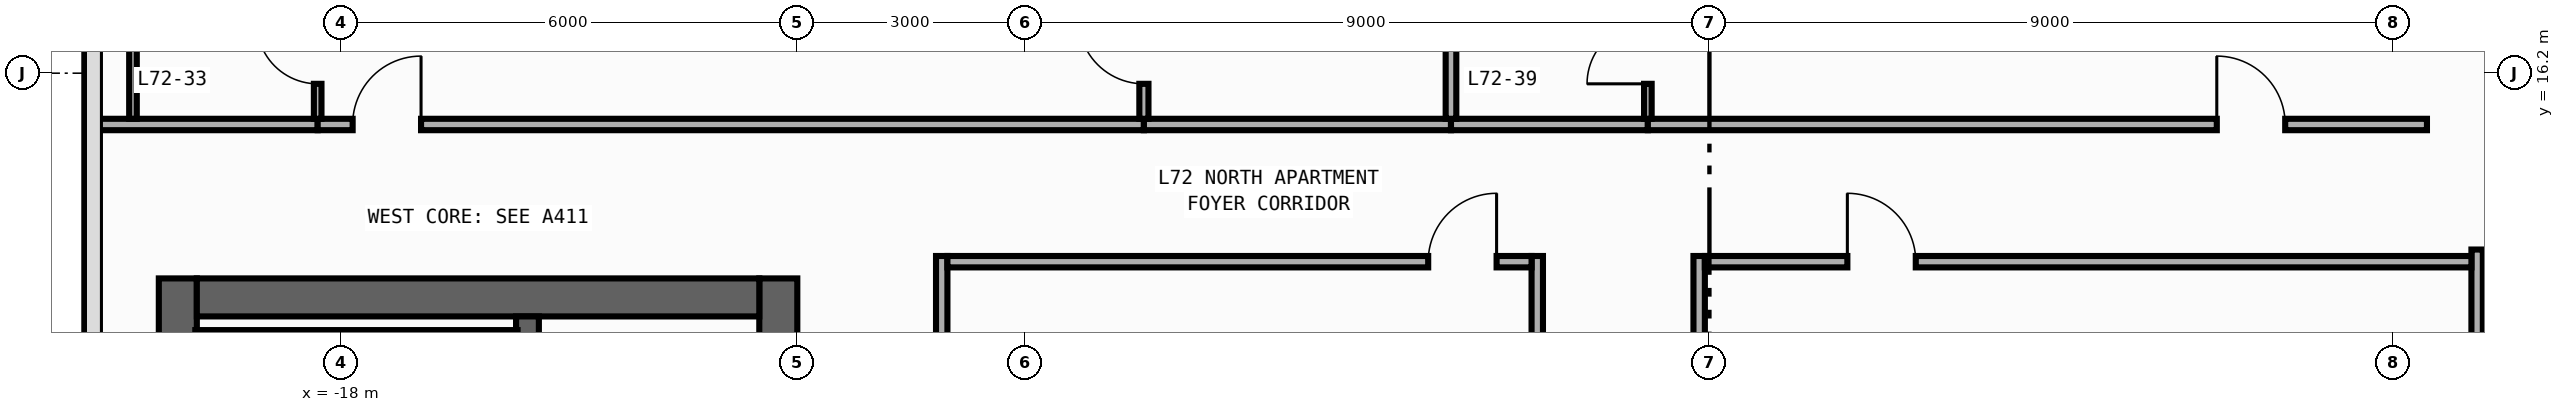
"""IFC4 building model, lengths in metres.
Left out: names, types, materials, properties, quantities, classifications, styles, units other than length and angle.
Written with IfcOpenShell. Run it as: python <this file> out.ifc"""

import sys

from ifc_helpers import new_model, si_unit, direction, frame, frame_2d, origin, place, context, subcontext, project, spatial, rectangle, extrude, element, fill, save


model = new_model("IFC4")
c1 = context("Model", 3, precision=1e-05, world=origin(), true_north=direction((0.0, 1.0)))
c2 = subcontext(c1, "Body", "Model", "MODEL_VIEW")
j1 = project(units=[si_unit("LENGTHUNIT", "METRE"), si_unit("PLANEANGLEUNIT", "RADIAN")], contexts=[c1])
p1 = place(None, origin())
s1 = spatial("IfcSite", under=j1, at=p1, CompositionType="ELEMENT")
p2 = place(p1, origin())
s2 = spatial("IfcBuilding", under=s1, at=p2, CompositionType="ELEMENT")
p3 = place(p2, frame((0.0, 0.0, 300.4)))
s3 = spatial("IfcBuildingStorey", under=s2, at=p3, CompositionType="ELEMENT", Elevation=300.4)
p4 = place(p3, frame((-20.15, -13.5, 0.0), z_axis=(0.0, 0.0, 1.0), x_axis=(0.0, 1.0, 0.0)))
e1 = element("IfcWall", 1, at=p4, inside=s3, PredefinedType="SHEAR", context=c2, shape_type="SweptSolid", body=[
    extrude(rectangle(XDim=27.0, YDim=0.5, at=frame_2d((13.5, 0.0))), origin(), (0.0, 0.0, 1.0), 3.54),
])
p5 = place(p3, frame((-12.25, -13.5, 0.0), z_axis=(0.0, 0.0, 1.0), x_axis=(0.0, 1.0, 0.0)))
e2 = element("IfcWall", 2, at=p5, inside=s3, PredefinedType="SHEAR", context=c2, shape_type="SweptSolid", body=[
    extrude(rectangle(XDim=27.0, YDim=0.5, at=frame_2d((13.5, 0.0))), origin(), (0.0, 0.0, 1.0), 3.54),
])
p6 = place(p5, frame((15.175, 0.0, 0.0)))
e3 = element("IfcOpeningElement", 3, at=p6, cuts=e2, PredefinedType="OPENING", context=c2, shape_type="SweptSolid", body=[
    extrude(rectangle(XDim=0.85, YDim=2.1, at=frame_2d((0.425, 1.05))), frame((0.0, 0.26, 0.0), z_axis=(0.0, -1.0, 0.0), x_axis=(1.0, 0.0, 0.0)), (0.0, 0.0, 1.0), 0.52),
])
p7 = place(p5, frame((21.275, 0.0, 0.0)))
e4 = element("IfcOpeningElement", 4, at=p7, cuts=e2, PredefinedType="OPENING", context=c2, shape_type="SweptSolid", body=[
    extrude(rectangle(XDim=0.85, YDim=2.1, at=frame_2d((0.425, 1.05))), frame((0.0, 0.26, 0.0), z_axis=(0.0, -1.0, 0.0), x_axis=(1.0, 0.0, 0.0)), (0.0, 0.0, 1.0), 0.52),
])
p8 = place(p5, frame((4.275, 0.0, 0.0)))
e5 = element("IfcOpeningElement", 5, at=p8, cuts=e2, PredefinedType="OPENING", context=c2, shape_type="SweptSolid", body=[
    extrude(rectangle(XDim=0.85, YDim=2.1, at=frame_2d((0.425, 1.05))), frame((0.0, 0.26, 0.0), z_axis=(0.0, -1.0, 0.0), x_axis=(1.0, 0.0, 0.0)), (0.0, 0.0, 1.0), 0.52),
])
p9 = place(p5, frame((10.275, 0.0, 0.0)))
e6 = element("IfcOpeningElement", 6, at=p9, cuts=e2, PredefinedType="OPENING", context=c2, shape_type="SweptSolid", body=[
    extrude(rectangle(XDim=0.85, YDim=2.1, at=frame_2d((0.425, 1.05))), frame((0.0, 0.26, 0.0), z_axis=(0.0, -1.0, 0.0), x_axis=(1.0, 0.0, 0.0)), (0.0, 0.0, 1.0), 0.52),
])
p10 = place(p5, frame((12.725, 0.0, 0.0)))
e7 = element("IfcOpeningElement", 7, at=p10, cuts=e2, PredefinedType="OPENING", context=c2, shape_type="SweptSolid", body=[
    extrude(rectangle(XDim=1.15, YDim=2.2, at=frame_2d((0.575, 1.1))), frame((0.0, 0.26, 0.0), z_axis=(0.0, -1.0, 0.0), x_axis=(1.0, 0.0, 0.0)), (0.0, 0.0, 1.0), 0.52),
])
p11 = place(p5, frame((1.625, 0.0, 0.0)))
e8 = element("IfcOpeningElement", 8, at=p11, cuts=e2, PredefinedType="OPENING", context=c2, shape_type="SweptSolid", body=[
    extrude(rectangle(XDim=0.85, YDim=2.1, at=frame_2d((0.425, 1.05))), frame((0.0, 0.26, 0.0), z_axis=(0.0, -1.0, 0.0), x_axis=(1.0, 0.0, 0.0)), (0.0, 0.0, 1.0), 0.52),
])
p12 = place(p3, frame((-19.9, 13.25, 0.0), z_axis=(0.0, 0.0, 1.0), x_axis=(1.0, 0.0, 0.0)))
e9 = element("IfcWall", 9, at=p12, inside=s3, PredefinedType="SHEAR", context=c2, shape_type="SweptSolid", body=[
    extrude(rectangle(XDim=7.4, YDim=0.5, at=frame_2d((3.7, 0.0))), origin(), (0.0, 0.0, 1.0), 3.54),
])
p13 = place(p3, frame((-15.55, -13.0, 0.0), z_axis=(0.0, 0.0, 1.0), x_axis=(0.0, 1.0, 0.0)))
e10 = element("IfcWall", 10, at=p13, inside=s3, PredefinedType="SHEAR", context=c2, shape_type="SweptSolid", body=[
    extrude(rectangle(XDim=26.0, YDim=0.3, at=frame_2d((13.0, 0.0))), origin(), (0.0, 0.0, 1.0), 3.54),
])
p14 = place(p13, frame((12.225, 0.0, 0.0)))
e11 = element("IfcOpeningElement", 11, at=p14, cuts=e10, PredefinedType="OPENING", context=c2, shape_type="SweptSolid", body=[
    extrude(rectangle(XDim=1.15, YDim=2.2, at=frame_2d((0.575, 1.1))), frame((0.0, 0.16, 0.0), z_axis=(0.0, -1.0, 0.0), x_axis=(1.0, 0.0, 0.0)), (0.0, 0.0, 1.0), 0.32),
])
p15 = place(p13, frame((1.125, 0.0, 0.0)))
e12 = element("IfcOpeningElement", 12, at=p15, cuts=e10, PredefinedType="OPENING", context=c2, shape_type="SweptSolid", body=[
    extrude(rectangle(XDim=0.85, YDim=2.1, at=frame_2d((0.425, 1.05))), frame((0.0, 0.16, 0.0), z_axis=(0.0, -1.0, 0.0), x_axis=(1.0, 0.0, 0.0)), (0.0, 0.0, 1.0), 0.32),
])
p16 = place(p3, frame((-19.92, 12.71, 0.0), z_axis=(0.0, 0.0, 1.0), x_axis=(1.0, 0.0, 0.0)))
e13 = element("IfcWall", 13, at=p16, inside=s3, PredefinedType="SHEAR", context=c2, shape_type="SweptSolid", body=[
    extrude(rectangle(XDim=4.24, YDim=0.22, at=frame_2d((2.12, 0.0))), origin(), (0.0, 0.0, 1.0), 3.54),
])
p17 = place(p3, frame((-10.1, -0.61, 0.0), z_axis=(0.0, 0.0, 1.0), x_axis=(0.0, 1.0, 0.0)))
e14 = element("IfcWall", 14, at=p17, inside=s3, PredefinedType="PARTITIONING", context=c2, shape_type="SweptSolid", body=[
    extrude(rectangle(XDim=14.405, YDim=0.15, at=frame_2d((7.203, 0.0))), origin(), (0.0, 0.0, 1.0), 3.54),
])
p18 = place(p17, frame((5.535, 0.0, 0.0)))
e15 = element("IfcOpeningElement", 15, at=p18, cuts=e14, PredefinedType="OPENING", context=c2, shape_type="SweptSolid", body=[
    extrude(rectangle(XDim=0.9, YDim=2.15, at=frame_2d((0.45, 1.075))), frame((0.0, 0.085, 0.0), z_axis=(0.0, -1.0, 0.0), x_axis=(1.0, 0.0, 0.0)), (0.0, 0.0, 1.0), 0.17),
])
p19 = place(p3, frame((10.1, -0.61, 0.0), z_axis=(0.0, 0.0, 1.0), x_axis=(0.0, 1.0, 0.0)))
e16 = element("IfcWall", 16, at=p19, inside=s3, PredefinedType="PARTITIONING", context=c2, shape_type="SweptSolid", body=[
    extrude(rectangle(XDim=14.49, YDim=0.15, at=frame_2d((7.245, 0.0))), origin(), (0.0, 0.0, 1.0), 3.54),
])
p20 = place(p19, frame((5.488, 0.0, 0.0)))
e17 = element("IfcOpeningElement", 17, at=p20, cuts=e16, PredefinedType="OPENING", context=c2, shape_type="SweptSolid", body=[
    extrude(rectangle(XDim=0.9, YDim=2.15, at=frame_2d((0.45, 1.075))), frame((0.0, 0.085, 0.0), z_axis=(0.0, -1.0, 0.0), x_axis=(1.0, 0.0, 0.0)), (0.0, 0.0, 1.0), 0.17),
])
p21 = place(p3, frame((-2.265, -0.46, 0.0), z_axis=(0.0, 0.0, 1.0), x_axis=(0.0, 1.0, 0.0)))
e18 = element("IfcWall", 18, at=p21, inside=s3, PredefinedType="PARTITIONING", context=c2, shape_type="SweptSolid", body=[
    extrude(rectangle(XDim=14.255, YDim=0.15, at=frame_2d((7.127, 0.0))), origin(), (0.0, 0.0, 1.0), 3.54),
])
p22 = place(p21, frame((5.474, 0.0, 0.0)))
e19 = element("IfcOpeningElement", 19, at=p22, cuts=e18, PredefinedType="OPENING", context=c2, shape_type="SweptSolid", body=[
    extrude(rectangle(XDim=0.9, YDim=2.15, at=frame_2d((0.45, 1.075))), frame((0.0, 0.085, 0.0), z_axis=(0.0, -1.0, 0.0), x_axis=(1.0, 0.0, 0.0)), (0.0, 0.0, 1.0), 0.17),
])
p23 = place(p3, frame((-0.135, -0.46, 0.0), z_axis=(0.0, 0.0, 1.0), x_axis=(0.0, 1.0, 0.0)))
e20 = element("IfcWall", 20, at=p23, inside=s3, PredefinedType="PARTITIONING", context=c2, shape_type="SweptSolid", body=[
    extrude(rectangle(XDim=14.255, YDim=0.15, at=frame_2d((7.127, 0.0))), origin(), (0.0, 0.0, 1.0), 3.54),
])
p24 = place(p23, frame((5.474, 0.0, 0.0)))
e21 = element("IfcOpeningElement", 21, at=p24, cuts=e20, PredefinedType="OPENING", context=c2, shape_type="SweptSolid", body=[
    extrude(rectangle(XDim=0.9, YDim=2.15, at=frame_2d((0.45, 1.075))), frame((0.0, 0.085, 0.0), z_axis=(0.0, -1.0, 0.0), x_axis=(1.0, 0.0, 0.0)), (0.0, 0.0, 1.0), 0.17),
])
p25 = place(p3, frame((-21.255, 15.525, 0.0), z_axis=(0.0, 0.0, 1.0), x_axis=(1.0, 0.0, 0.0)))
e22 = element("IfcWall", 22, at=p25, inside=s3, PredefinedType="PARTITIONING", context=c2, shape_type="SweptSolid", body=[
    extrude(rectangle(XDim=2.945, YDim=0.15, at=frame_2d((1.472, 0.0))), origin(), (0.0, 0.0, 1.0), 3.54),
])
p26 = place(p3, frame((-18.31, 15.525, 0.0), z_axis=(0.0, 0.0, 1.0), x_axis=(1.0, 0.0, 0.0)))
e23 = element("IfcWall", 23, at=p26, inside=s3, PredefinedType="PARTITIONING", context=c2, shape_type="SweptSolid", body=[
    extrude(rectangle(XDim=10.87, YDim=0.15, at=frame_2d((5.435, 0.0))), origin(), (0.0, 0.0, 1.0), 3.54),
])
p27 = place(p26, frame((0.46, 0.0, 0.0)))
e24 = element("IfcOpeningElement", 24, at=p27, cuts=e23, PredefinedType="OPENING", context=c2, shape_type="SweptSolid", body=[
    extrude(rectangle(XDim=0.9, YDim=2.15, at=frame_2d((0.45, 1.075))), frame((0.0, 0.085, 0.0), z_axis=(0.0, -1.0, 0.0), x_axis=(1.0, 0.0, 0.0)), (0.0, 0.0, 1.0), 0.17),
])
p28 = place(p3, frame((-7.44, 15.525, 0.0), z_axis=(0.0, 0.0, 1.0), x_axis=(1.0, 0.0, 0.0)))
e25 = element("IfcWall", 25, at=p28, inside=s3, PredefinedType="PARTITIONING", context=c2, shape_type="SweptSolid", body=[
    extrude(rectangle(XDim=4.04, YDim=0.15, at=frame_2d((2.02, 0.0))), origin(), (0.0, 0.0, 1.0), 3.54),
])
p29 = place(p3, frame((-3.4, 15.525, 0.0), z_axis=(0.0, 0.0, 1.0), x_axis=(1.0, 0.0, 0.0)))
e26 = element("IfcWall", 26, at=p29, inside=s3, PredefinedType="PARTITIONING", context=c2, shape_type="SweptSolid", body=[
    extrude(rectangle(XDim=2.59, YDim=0.15, at=frame_2d((1.295, 0.0))), origin(), (0.0, 0.0, 1.0), 3.54),
])
p30 = place(p3, frame((-0.81, 15.525, 0.0), z_axis=(0.0, 0.0, 1.0), x_axis=(1.0, 0.0, 0.0)))
e27 = element("IfcWall", 27, at=p30, inside=s3, PredefinedType="PARTITIONING", context=c2, shape_type="SweptSolid", body=[
    extrude(rectangle(XDim=10.25, YDim=0.15, at=frame_2d((5.125, 0.0))), origin(), (0.0, 0.0, 1.0), 3.54),
])
p31 = place(p30, frame((7.485, 0.0, 0.0)))
e28 = element("IfcOpeningElement", 28, at=p31, cuts=e27, PredefinedType="OPENING", context=c2, shape_type="SweptSolid", body=[
    extrude(rectangle(XDim=0.9, YDim=2.15, at=frame_2d((0.45, 1.075))), frame((0.0, 0.085, 0.0), z_axis=(0.0, -1.0, 0.0), x_axis=(1.0, 0.0, 0.0)), (0.0, 0.0, 1.0), 0.17),
])
p32 = place(p3, frame((-10.025, 13.72, 0.0), z_axis=(0.0, 0.0, 1.0), x_axis=(1.0, 0.0, 0.0)))
e29 = element("IfcWall", 29, at=p32, inside=s3, PredefinedType="PARTITIONING", context=c2, shape_type="SweptSolid", body=[
    extrude(rectangle(XDim=7.685, YDim=0.15, at=frame_2d((3.842, 0.0))), origin(), (0.0, 0.0, 1.0), 3.54),
])
p33 = place(p32, frame((6.325, 0.0, 0.0)))
e30 = element("IfcOpeningElement", 30, at=p33, cuts=e29, PredefinedType="OPENING", context=c2, shape_type="SweptSolid", body=[
    extrude(rectangle(XDim=0.9, YDim=2.15, at=frame_2d((0.45, 1.075))), frame((0.0, 0.085, 0.0), z_axis=(0.0, -1.0, 0.0), x_axis=(1.0, 0.0, 0.0)), (0.0, 0.0, 1.0), 0.17),
])
p34 = place(p3, frame((-0.06, 13.72, 0.0), z_axis=(0.0, 0.0, 1.0), x_axis=(1.0, 0.0, 0.0)))
e31 = element("IfcWall", 31, at=p34, inside=s3, PredefinedType="PARTITIONING", context=c2, shape_type="SweptSolid", body=[
    extrude(rectangle(XDim=10.085, YDim=0.15, at=frame_2d((5.042, 0.0))), origin(), (0.0, 0.0, 1.0), 3.54),
])
p35 = place(p34, frame((1.875, 0.0, 0.0)))
e32 = element("IfcOpeningElement", 32, at=p35, cuts=e31, PredefinedType="OPENING", context=c2, shape_type="SweptSolid", body=[
    extrude(rectangle(XDim=0.9, YDim=2.15, at=frame_2d((0.45, 1.075))), frame((0.0, 0.085, 0.0), z_axis=(0.0, -1.0, 0.0), x_axis=(1.0, 0.0, 0.0)), (0.0, 0.0, 1.0), 0.17),
])
p36 = place(p3, frame((-18.31, 15.6, 0.0), z_axis=(0.0, 0.0, 1.0), x_axis=(0.0, 1.0, 0.0)))
e33 = element("IfcWall", 33, at=p36, inside=s3, PredefinedType="PARTITIONING", context=c2, shape_type="SweptSolid", body=[
    extrude(rectangle(XDim=2.5, YDim=0.1, at=frame_2d((1.25, 0.0))), origin(), (0.0, 0.0, 1.0), 3.54),
])
p37 = place(p36, frame((0.46, 0.0, 0.0)))
e34 = element("IfcOpeningElement", 34, at=p37, cuts=e33, PredefinedType="OPENING", context=c2, shape_type="SweptSolid", body=[
    extrude(rectangle(XDim=0.8, YDim=2.1, at=frame_2d((0.4, 1.05))), frame((0.0, 0.06, 0.0), z_axis=(0.0, -1.0, 0.0), x_axis=(1.0, 0.0, 0.0)), (0.0, 0.0, 1.0), 0.12),
])
p38 = place(p3, frame((-7.44, 15.6, 0.0), z_axis=(0.0, 0.0, 1.0), x_axis=(0.0, 1.0, 0.0)))
e35 = element("IfcWall", 35, at=p38, inside=s3, PredefinedType="PARTITIONING", context=c2, shape_type="SweptSolid", body=[
    extrude(rectangle(XDim=4.5, YDim=0.12, at=frame_2d((2.25, 0.0))), origin(), (0.0, 0.0, 1.0), 3.54),
])
p39 = place(p38, frame((0.46, 0.0, 0.0)))
e36 = element("IfcOpeningElement", 36, at=p39, cuts=e35, PredefinedType="OPENING", context=c2, shape_type="SweptSolid", body=[
    extrude(rectangle(XDim=0.86, YDim=2.15, at=frame_2d((0.43, 1.075))), frame((0.0, 0.07, 0.0), z_axis=(0.0, -1.0, 0.0), x_axis=(1.0, 0.0, 0.0)), (0.0, 0.0, 1.0), 0.14),
])
p40 = place(p3, frame((-3.4, 15.6, 0.0), z_axis=(0.0, 0.0, 1.0), x_axis=(0.0, 1.0, 0.0)))
e37 = element("IfcWall", 37, at=p40, inside=s3, PredefinedType="PARTITIONING", context=c2, shape_type="SweptSolid", body=[
    extrude(rectangle(XDim=2.5, YDim=0.14, at=frame_2d((1.25, 0.0))), origin(), (0.0, 0.0, 1.0), 3.54),
])
p41 = place(p3, frame((-0.81, 15.6, 0.0), z_axis=(0.0, 0.0, 1.0), x_axis=(0.0, 1.0, 0.0)))
e38 = element("IfcWall", 38, at=p41, inside=s3, PredefinedType="PARTITIONING", context=c2, shape_type="SweptSolid", body=[
    extrude(rectangle(XDim=2.5, YDim=0.1, at=frame_2d((1.25, 0.0))), origin(), (0.0, 0.0, 1.0), 3.54),
])
p42 = place(p41, frame((0.46, 0.0, 0.0)))
e39 = element("IfcOpeningElement", 39, at=p42, cuts=e38, PredefinedType="OPENING", context=c2, shape_type="SweptSolid", body=[
    extrude(rectangle(XDim=0.8, YDim=2.1, at=frame_2d((0.4, 1.05))), frame((0.0, 0.06, 0.0), z_axis=(0.0, -1.0, 0.0), x_axis=(1.0, 0.0, 0.0)), (0.0, 0.0, 1.0), 0.12),
])
p43 = place(p3, frame((-20.74, 15.6, 0.0), z_axis=(0.0, 0.0, 1.0), x_axis=(0.0, 1.0, 0.0)))
e40 = element("IfcWall", 40, at=p43, inside=s3, PredefinedType="PARTITIONING", context=c2, shape_type="SweptSolid", body=[
    extrude(rectangle(XDim=2.45, YDim=0.1, at=frame_2d((1.225, 0.0))), origin(), (0.0, 0.0, 1.0), 3.54),
])
p44 = place(p27, origin())
e41 = element("IfcDoor", 41, at=p44, inside=s3, OperationType="SINGLE_SWING_RIGHT", PredefinedType="DOOR", context=c2, shape_type="SweptSolid", body=[
    extrude(rectangle(XDim=0.9, YDim=2.15, at=frame_2d((0.45, 1.075))), frame((0.0, 0.025, 0.0), z_axis=(0.0, -1.0, 0.0), x_axis=(1.0, 0.0, 0.0)), (0.0, 0.0, 1.0), 0.05),
])
fill(e24, e41)
p45 = place(p31, origin())
e42 = element("IfcDoor", 42, at=p45, inside=s3, OperationType="SINGLE_SWING_LEFT", PredefinedType="DOOR", context=c2, shape_type="SweptSolid", body=[
    extrude(rectangle(XDim=0.9, YDim=2.15, at=frame_2d((0.45, 1.075))), frame((0.0, 0.025, 0.0), z_axis=(0.0, -1.0, 0.0), x_axis=(1.0, 0.0, 0.0)), (0.0, 0.0, 1.0), 0.05),
])
fill(e28, e42)
p46 = place(p33, origin())
e43 = element("IfcDoor", 43, at=p46, inside=s3, OperationType="SINGLE_SWING_RIGHT", PredefinedType="DOOR", context=c2, shape_type="SweptSolid", body=[
    extrude(rectangle(XDim=0.9, YDim=2.15, at=frame_2d((0.45, 1.075))), frame((0.0, 0.025, 0.0), z_axis=(0.0, -1.0, 0.0), x_axis=(1.0, 0.0, 0.0)), (0.0, 0.0, 1.0), 0.05),
])
fill(e30, e43)
p47 = place(p35, origin())
e44 = element("IfcDoor", 44, at=p47, inside=s3, OperationType="SINGLE_SWING_LEFT", PredefinedType="DOOR", context=c2, shape_type="SweptSolid", body=[
    extrude(rectangle(XDim=0.9, YDim=2.15, at=frame_2d((0.45, 1.075))), frame((0.0, 0.025, 0.0), z_axis=(0.0, -1.0, 0.0), x_axis=(1.0, 0.0, 0.0)), (0.0, 0.0, 1.0), 0.05),
])
fill(e32, e44)
p48 = place(p37, origin())
e45 = element("IfcDoor", 45, at=p48, inside=s3, OperationType="SINGLE_SWING_RIGHT", PredefinedType="DOOR", context=c2, shape_type="SweptSolid", body=[
    extrude(rectangle(XDim=0.8, YDim=2.1, at=frame_2d((0.4, 1.05))), frame((0.0, 0.025, 0.0), z_axis=(0.0, -1.0, 0.0), x_axis=(1.0, 0.0, 0.0)), (0.0, 0.0, 1.0), 0.05),
])
fill(e34, e45)
p49 = place(p39, origin())
e46 = element("IfcDoor", 46, at=p49, inside=s3, OperationType="SINGLE_SWING_RIGHT", PredefinedType="DOOR", context=c2, shape_type="SweptSolid", body=[
    extrude(rectangle(XDim=0.86, YDim=2.15, at=frame_2d((0.43, 1.075))), frame((0.0, 0.025, 0.0), z_axis=(0.0, -1.0, 0.0), x_axis=(1.0, 0.0, 0.0)), (0.0, 0.0, 1.0), 0.05),
])
fill(e36, e46)
p50 = place(p42, origin())
e47 = element("IfcDoor", 47, at=p50, inside=s3, OperationType="SINGLE_SWING_LEFT", PredefinedType="DOOR", context=c2, shape_type="SweptSolid", body=[
    extrude(rectangle(XDim=0.8, YDim=2.1, at=frame_2d((0.4, 1.05))), frame((0.0, 0.025, 0.0), z_axis=(0.0, -1.0, 0.0), x_axis=(1.0, 0.0, 0.0)), (0.0, 0.0, 1.0), 0.05),
])
fill(e39, e47)
save(model, sys.argv[1])
